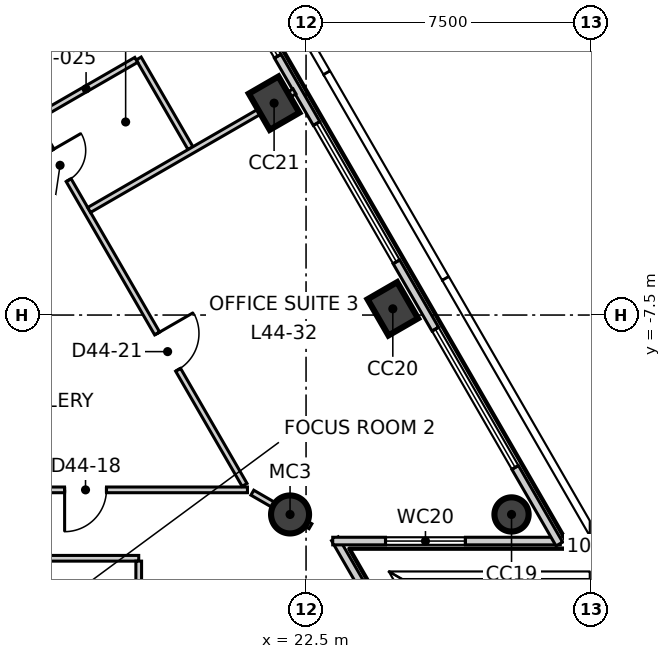
"""IFC4 building model, lengths in metres.
Left out: names, types, materials, properties, quantities, classifications, styles, units other than length and angle.
Written with IfcOpenShell. Run it as: python <this file> out.ifc"""

import sys

from ifc_helpers import new_model, si_unit, direction, frame, frame_2d, origin, origin_2d, place, context, subcontext, project, spatial, rectangle, circle, extrude, element, fill, save


model = new_model("IFC4")
c1 = context("Model", 3, precision=1e-05, world=origin(), true_north=direction((0.0, 1.0)))
c2 = subcontext(c1, "Body", "Model", "MODEL_VIEW")
j1 = project(units=[si_unit("LENGTHUNIT", "METRE"), si_unit("PLANEANGLEUNIT", "RADIAN")], contexts=[c1])
p1 = place(None, origin())
s1 = spatial("IfcSite", under=j1, at=p1, CompositionType="ELEMENT")
p2 = place(p1, origin())
s2 = spatial("IfcBuilding", under=s1, at=p2, CompositionType="ELEMENT")
p3 = place(p2, frame((0.0, 0.0, 191.3)))
s3 = spatial("IfcBuildingStorey", under=s2, at=p3, CompositionType="ELEMENT", Elevation=191.3)
p4 = place(p3, frame((27.907, -12.747, -0.3), z_axis=(0.0, 0.0, 1.0), x_axis=(-0.5, 0.866025403784, 0.0)))
e1 = element("IfcColumn", 1, at=p4, inside=s3, PredefinedType="COLUMN", context=c2, shape_type="SweptSolid", body=[
    extrude(circle(Radius=0.45, at=origin_2d()), origin(), (0.0, 0.0, 1.0), 4.0),
])
for number, where, z_axis, x_axis in (
    (2, (24.783, -7.336, -0.3), (0.0, 0.0, 1.0), (-0.5, 0.866, 0.0)),
    (3, (21.659, -1.925, -0.3), (0.0, 0.0, 1.0), (-0.5, 0.866, 0.0)),
):
    element("IfcColumn", number, at=place(p3, frame(where, z_axis=z_axis, x_axis=x_axis)), inside=s3, PredefinedType="COLUMN", context=c2, shape_type="SweptSolid", body=[
        extrude(rectangle(XDim=1.1, YDim=0.9, at=origin_2d()), origin(), (0.0, 0.0, 1.0), 4.0),
    ])
p5 = place(p3, frame((22.079, -12.747, -0.3), z_axis=(0.0, 0.0, 1.0), x_axis=(1.0, 0.0, 0.0)))
e4 = element("IfcColumn", 4, at=p5, inside=s3, PredefinedType="COLUMN", context=c2, shape_type="SweptSolid", body=[
    extrude(circle(Radius=0.5, at=origin_2d()), origin(), (0.0, 0.0, 1.0), 4.0),
])
p6 = place(p3, frame((26.251, -18.573, 0.0), z_axis=(0.0, 0.0, 1.0), x_axis=(-0.499896541353, 0.866085127423, 0.0)))
e5 = element("IfcWall", 5, at=p6, inside=s3, PredefinedType="ELEMENTEDWALL", context=c2, shape_type="SweptSolid", body=[
    extrude(rectangle(XDim=5.989, YDim=0.2, at=frame_2d((2.995, 0.0))), origin(), (0.0, 0.0, 1.0), 3.7),
])
p7 = place(p6, frame((1.99, 0.0, 0.9)))
e6 = element("IfcOpeningElement", 6, at=p7, cuts=e5, PredefinedType="OPENING", context=c2, shape_type="SweptSolid", body=[
    extrude(rectangle(XDim=2.1, YDim=2.5, at=frame_2d((1.05, 1.25))), frame((0.0, 0.11, 0.0), z_axis=(0.0, -1.0, 0.0), x_axis=(1.0, 0.0, 0.0)), (0.0, 0.0, 1.0), 0.22),
])
p8 = place(p3, frame((23.202, -13.447, 0.0), z_axis=(0.0, 0.0, 1.0), x_axis=(1.0, 0.0, 0.0)))
e7 = element("IfcWall", 7, at=p8, inside=s3, PredefinedType="ELEMENTEDWALL", context=c2, shape_type="SweptSolid", body=[
    extrude(rectangle(XDim=5.988, YDim=0.2, at=frame_2d((2.994, 0.0))), origin(), (0.0, 0.0, 1.0), 3.7),
])
p9 = place(p8, frame((1.39, 0.0, 0.9)))
e8 = element("IfcOpeningElement", 8, at=p9, cuts=e7, PredefinedType="OPENING", context=c2, shape_type="SweptSolid", body=[
    extrude(rectangle(XDim=2.1, YDim=2.5, at=frame_2d((1.05, 1.25))), frame((0.0, 0.11, 0.0), z_axis=(0.0, -1.0, 0.0), x_axis=(1.0, 0.0, 0.0)), (0.0, 0.0, 1.0), 0.22),
])
p10 = place(p3, frame((29.165, -13.525, 0.0), z_axis=(0.0, 0.0, 1.0), x_axis=(-0.500008941164, 0.86602024154, 0.0)))
e9 = element("IfcWall", 9, at=p10, inside=s3, PredefinedType="ELEMENTEDWALL", context=c2, shape_type="SweptSolid", body=[
    extrude(rectangle(XDim=52.571, YDim=0.2, at=frame_2d((26.286, 0.0))), origin(), (0.0, 0.0, 1.0), 3.7),
])
p11 = place(p10, frame((2.327, 0.0, 0.9)))
e10 = element("IfcOpeningElement", 10, at=p11, cuts=e9, PredefinedType="OPENING", context=c2, shape_type="SweptSolid", body=[
    extrude(rectangle(XDim=4.2, YDim=2.5, at=frame_2d((2.1, 1.25))), frame((0.0, 0.11, 0.0), z_axis=(0.0, -1.0, 0.0), x_axis=(1.0, 0.0, 0.0)), (0.0, 0.0, 1.0), 0.22),
])
p12 = place(p10, frame((8.575, 0.0, 0.9)))
e11 = element("IfcOpeningElement", 11, at=p12, cuts=e9, PredefinedType="OPENING", context=c2, shape_type="SweptSolid", body=[
    extrude(rectangle(XDim=4.2, YDim=2.5, at=frame_2d((2.1, 1.25))), frame((0.0, 0.11, 0.0), z_axis=(0.0, -1.0, 0.0), x_axis=(1.0, 0.0, 0.0)), (0.0, 0.0, 1.0), 0.22),
])
p13 = place(p10, frame((14.823, 0.0, 0.9)))
e12 = element("IfcOpeningElement", 12, at=p13, cuts=e9, PredefinedType="OPENING", context=c2, shape_type="SweptSolid", body=[
    extrude(rectangle(XDim=4.2, YDim=2.5, at=frame_2d((2.1, 1.25))), frame((0.0, 0.11, 0.0), z_axis=(0.0, -1.0, 0.0), x_axis=(1.0, 0.0, 0.0)), (0.0, 0.0, 1.0), 0.22),
])
p14 = place(p10, frame((21.072, 0.0, 0.9)))
e13 = element("IfcOpeningElement", 13, at=p14, cuts=e9, PredefinedType="OPENING", context=c2, shape_type="SweptSolid", body=[
    extrude(rectangle(XDim=4.2, YDim=2.5, at=frame_2d((2.1, 1.25))), frame((0.0, 0.11, 0.0), z_axis=(0.0, -1.0, 0.0), x_axis=(1.0, 0.0, 0.0)), (0.0, 0.0, 1.0), 0.22),
])
p15 = place(p10, frame((27.32, 0.0, 0.9)))
e14 = element("IfcOpeningElement", 14, at=p15, cuts=e9, PredefinedType="OPENING", context=c2, shape_type="SweptSolid", body=[
    extrude(rectangle(XDim=4.2, YDim=2.5, at=frame_2d((2.1, 1.25))), frame((0.0, 0.11, 0.0), z_axis=(0.0, -1.0, 0.0), x_axis=(1.0, 0.0, 0.0)), (0.0, 0.0, 1.0), 0.22),
])
p16 = place(p10, frame((33.568, 0.0, 0.9)))
e15 = element("IfcOpeningElement", 15, at=p16, cuts=e9, PredefinedType="OPENING", context=c2, shape_type="SweptSolid", body=[
    extrude(rectangle(XDim=4.2, YDim=2.5, at=frame_2d((2.1, 1.25))), frame((0.0, 0.11, 0.0), z_axis=(0.0, -1.0, 0.0), x_axis=(1.0, 0.0, 0.0)), (0.0, 0.0, 1.0), 0.22),
])
p17 = place(p10, frame((39.816, 0.0, 0.9)))
e16 = element("IfcOpeningElement", 16, at=p17, cuts=e9, PredefinedType="OPENING", context=c2, shape_type="SweptSolid", body=[
    extrude(rectangle(XDim=4.2, YDim=2.5, at=frame_2d((2.1, 1.25))), frame((0.0, 0.11, 0.0), z_axis=(0.0, -1.0, 0.0), x_axis=(1.0, 0.0, 0.0)), (0.0, 0.0, 1.0), 0.22),
])
p18 = place(p10, frame((46.064, 0.0, 0.9)))
e17 = element("IfcOpeningElement", 17, at=p18, cuts=e9, PredefinedType="OPENING", context=c2, shape_type="SweptSolid", body=[
    extrude(rectangle(XDim=4.2, YDim=2.5, at=frame_2d((2.1, 1.25))), frame((0.0, 0.11, 0.0), z_axis=(0.0, -1.0, 0.0), x_axis=(1.0, 0.0, 0.0)), (0.0, 0.0, 1.0), 0.22),
])
p19 = place(p3, frame((-20.808, -12.1, 0.0), z_axis=(0.0, 0.0, 1.0), x_axis=(1.0, 0.0, 0.0)))
e18 = element("IfcWall", 18, at=p19, inside=s3, PredefinedType="PARTITIONING", context=c2, shape_type="SweptSolid", body=[
    extrude(rectangle(XDim=41.766, YDim=0.15, at=frame_2d((20.883, 0.0))), origin(), (0.0, 0.0, 1.0), 3.7),
])
p20 = place(p19, frame((3.5, 0.0, 0.0)))
e19 = element("IfcOpeningElement", 19, at=p20, cuts=e18, PredefinedType="OPENING", context=c2, shape_type="SweptSolid", body=[
    extrude(rectangle(XDim=1.1, YDim=2.1, at=frame_2d((0.55, 1.05))), frame((0.0, 0.085, 0.0), z_axis=(0.0, -1.0, 0.0), x_axis=(1.0, 0.0, 0.0)), (0.0, 0.0, 1.0), 0.17),
])
p21 = place(p19, frame((18.362, 0.0, 0.0)))
e20 = element("IfcOpeningElement", 20, at=p21, cuts=e18, PredefinedType="OPENING", context=c2, shape_type="SweptSolid", body=[
    extrude(rectangle(XDim=1.1, YDim=2.1, at=frame_2d((0.55, 1.05))), frame((0.0, 0.085, 0.0), z_axis=(0.0, -1.0, 0.0), x_axis=(1.0, 0.0, 0.0)), (0.0, 0.0, 1.0), 0.17),
])
p22 = place(p19, frame((9.462, 0.0, 0.0)))
e21 = element("IfcOpeningElement", 21, at=p22, cuts=e18, PredefinedType="OPENING", context=c2, shape_type="SweptSolid", body=[
    extrude(rectangle(XDim=0.9, YDim=2.1, at=frame_2d((0.45, 1.05))), frame((0.0, 0.085, 0.0), z_axis=(0.0, -1.0, 0.0), x_axis=(1.0, 0.0, 0.0)), (0.0, 0.0, 1.0), 0.17),
])
p23 = place(p19, frame((12.662, 0.0, 0.0)))
e22 = element("IfcOpeningElement", 22, at=p23, cuts=e18, PredefinedType="OPENING", context=c2, shape_type="SweptSolid", body=[
    extrude(rectangle(XDim=0.9, YDim=2.1, at=frame_2d((0.45, 1.05))), frame((0.0, 0.085, 0.0), z_axis=(0.0, -1.0, 0.0), x_axis=(1.0, 0.0, 0.0)), (0.0, 0.0, 1.0), 0.17),
])
p24 = place(p19, frame((15.362, 0.0, 0.0)))
e23 = element("IfcOpeningElement", 23, at=p24, cuts=e18, PredefinedType="OPENING", context=c2, shape_type="SweptSolid", body=[
    extrude(rectangle(XDim=1.0, YDim=2.1, at=frame_2d((0.5, 1.05))), frame((0.0, 0.085, 0.0), z_axis=(0.0, -1.0, 0.0), x_axis=(1.0, 0.0, 0.0)), (0.0, 0.0, 1.0), 0.17),
])
p25 = place(p19, frame((26.458, 0.0, 0.0)))
e24 = element("IfcOpeningElement", 24, at=p25, cuts=e18, PredefinedType="OPENING", context=c2, shape_type="SweptSolid", body=[
    extrude(rectangle(XDim=1.1, YDim=2.1, at=frame_2d((0.55, 1.05))), frame((0.0, 0.085, 0.0), z_axis=(0.0, -1.0, 0.0), x_axis=(1.0, 0.0, 0.0)), (0.0, 0.0, 1.0), 0.17),
])
p26 = place(p19, frame((36.955, 0.0, 0.0)))
e25 = element("IfcOpeningElement", 25, at=p26, cuts=e18, PredefinedType="OPENING", context=c2, shape_type="SweptSolid", body=[
    extrude(rectangle(XDim=1.1, YDim=2.1, at=frame_2d((0.55, 1.05))), frame((0.0, 0.085, 0.0), z_axis=(0.0, -1.0, 0.0), x_axis=(1.0, 0.0, 0.0)), (0.0, 0.0, 1.0), 0.17),
])
p27 = place(p3, frame((21.087, -12.174, 0.0), z_axis=(0.0, 0.0, 1.0), x_axis=(0.866022094817, -0.500005731256, 0.0)))
e26 = element("IfcWall", 26, at=p27, inside=s3, PredefinedType="PARTITIONING", context=c2, shape_type="SweptSolid", body=[
    extrude(rectangle(XDim=1.766, YDim=0.15, at=frame_2d((0.883, 0.0))), origin(), (0.0, 0.0, 1.0), 3.2),
])
p28 = place(p3, frame((0.075, 24.07, 0.0), z_axis=(0.0, 0.0, 1.0), x_axis=(0.49999939571, -0.866025752671, 0.0)))
e27 = element("IfcWall", 27, at=p28, inside=s3, PredefinedType="PARTITIONING", context=c2, shape_type="SweptSolid", body=[
    extrude(rectangle(XDim=41.614, YDim=0.15, at=frame_2d((20.807, 0.0))), origin(), (0.0, 0.0, 1.0), 3.7),
])
p29 = place(p28, frame((37.015, 0.0, 0.0)))
e28 = element("IfcOpeningElement", 28, at=p29, cuts=e27, PredefinedType="OPENING", context=c2, shape_type="SweptSolid", body=[
    extrude(rectangle(XDim=1.1, YDim=2.1, at=frame_2d((0.55, 1.05))), frame((0.0, 0.085, 0.0), z_axis=(0.0, -1.0, 0.0), x_axis=(1.0, 0.0, 0.0)), (0.0, 0.0, 1.0), 0.17),
])
p30 = place(p28, frame((25.154, 0.0, 0.0)))
e29 = element("IfcOpeningElement", 29, at=p30, cuts=e27, PredefinedType="OPENING", context=c2, shape_type="SweptSolid", body=[
    extrude(rectangle(XDim=1.0, YDim=2.1, at=frame_2d((0.5, 1.05))), frame((0.0, 0.085, 0.0), z_axis=(0.0, -1.0, 0.0), x_axis=(1.0, 0.0, 0.0)), (0.0, 0.0, 1.0), 0.17),
])
p31 = place(p28, frame((31.454, 0.0, 0.0)))
e30 = element("IfcOpeningElement", 30, at=p31, cuts=e27, PredefinedType="OPENING", context=c2, shape_type="SweptSolid", body=[
    extrude(rectangle(XDim=0.9, YDim=2.1, at=frame_2d((0.45, 1.05))), frame((0.0, 0.085, 0.0), z_axis=(0.0, -1.0, 0.0), x_axis=(1.0, 0.0, 0.0)), (0.0, 0.0, 1.0), 0.17),
])
p32 = place(p28, frame((17.157, 0.0, 0.0)))
e31 = element("IfcOpeningElement", 31, at=p32, cuts=e27, PredefinedType="OPENING", context=c2, shape_type="SweptSolid", body=[
    extrude(rectangle(XDim=1.0, YDim=2.1, at=frame_2d((0.5, 1.05))), frame((0.0, 0.085, 0.0), z_axis=(0.0, -1.0, 0.0), x_axis=(1.0, 0.0, 0.0)), (0.0, 0.0, 1.0), 0.17),
])
p33 = place(p28, frame((6.609, 0.0, 0.0)))
e32 = element("IfcOpeningElement", 32, at=p33, cuts=e27, PredefinedType="OPENING", context=c2, shape_type="SweptSolid", body=[
    extrude(rectangle(XDim=1.1, YDim=2.1, at=frame_2d((0.55, 1.05))), frame((0.0, 0.085, 0.0), z_axis=(0.0, -1.0, 0.0), x_axis=(1.0, 0.0, 0.0)), (0.0, 0.0, 1.0), 0.17),
])
p34 = place(p3, frame((18.096, -0.749, 0.0), z_axis=(0.0, 0.0, 1.0), x_axis=(0.500156697144, -0.865934915743, 0.0)))
e33 = element("IfcWall", 33, at=p34, inside=s3, PredefinedType="PARTITIONING", context=c2, shape_type="SweptSolid", body=[
    extrude(rectangle(XDim=2.725, YDim=0.15, at=frame_2d((1.363, 0.0))), origin(), (0.0, 0.0, 1.0), 3.7),
])
p35 = place(p3, frame((15.392, -2.31, 0.0), z_axis=(0.0, 0.0, 1.0), x_axis=(0.865941409278, 0.50014545454, 0.0)))
e34 = element("IfcWall", 34, at=p35, inside=s3, PredefinedType="PARTITIONING", context=c2, shape_type="SweptSolid", body=[
    extrude(rectangle(XDim=3.047, YDim=0.15, at=frame_2d((1.524, 0.0))), origin(), (0.0, 0.0, 1.0), 3.7),
])
p36 = place(p3, frame((16.792, -4.735, 0.0), z_axis=(0.0, 0.0, 1.0), x_axis=(0.86601944389, 0.500010322698, 0.0)))
e35 = element("IfcWall", 35, at=p36, inside=s3, PredefinedType="PARTITIONING", context=c2, shape_type="SweptSolid", body=[
    extrude(rectangle(XDim=6.24, YDim=0.15, at=frame_2d((3.12, 0.0))), origin(), (0.0, 0.0, 1.0), 3.7),
])
p37 = place(p3, frame((12.572, -13.9, 0.0), z_axis=(0.0, 0.0, 1.0), x_axis=(1.0, 0.0, 0.0)))
e36 = element("IfcWall", 36, at=p37, inside=s3, PredefinedType="PARTITIONING", context=c2, shape_type="SweptSolid", body=[
    extrude(rectangle(XDim=5.525, YDim=0.15, at=frame_2d((2.762, 0.0))), origin(), (0.0, 0.0, 1.0), 3.7),
])
p38 = place(p3, frame((18.097, -17.023, 0.0), z_axis=(0.0, 0.0, 1.0), x_axis=(0.0, 1.0, 0.0)))
e37 = element("IfcWall", 37, at=p38, inside=s3, PredefinedType="PARTITIONING", context=c2, shape_type="SweptSolid", body=[
    extrude(rectangle(XDim=3.048, YDim=0.15, at=frame_2d((1.524, 0.0))), origin(), (0.0, 0.0, 1.0), 3.7),
])
p39 = place(p38, frame((1.073, 0.0, 0.0)))
e38 = element("IfcOpeningElement", 38, at=p39, cuts=e37, PredefinedType="OPENING", context=c2, shape_type="SweptSolid", body=[
    extrude(rectangle(XDim=0.9, YDim=2.1, at=frame_2d((0.45, 1.05))), frame((0.0, 0.085, 0.0), z_axis=(0.0, -1.0, 0.0), x_axis=(1.0, 0.0, 0.0)), (0.0, 0.0, 1.0), 0.17),
])
p40 = place(p9, origin())
e39 = element("IfcWindow", 39, at=p40, inside=s3, PartitioningType="SINGLE_PANEL", PredefinedType="WINDOW", context=c2, shape_type="SweptSolid", body=[
    extrude(rectangle(XDim=2.1, YDim=2.5, at=frame_2d((1.05, 1.25))), frame((0.0, 0.03, 0.0), z_axis=(0.0, -1.0, 0.0), x_axis=(1.0, 0.0, 0.0)), (0.0, 0.0, 1.0), 0.06),
])
fill(e8, e39)
p41 = place(p11, origin())
e40 = element("IfcWindow", 40, at=p41, inside=s3, PartitioningType="SINGLE_PANEL", PredefinedType="WINDOW", context=c2, shape_type="SweptSolid", body=[
    extrude(rectangle(XDim=4.2, YDim=2.5, at=frame_2d((2.1, 1.25))), frame((0.0, 0.03, 0.0), z_axis=(0.0, -1.0, 0.0), x_axis=(1.0, 0.0, 0.0)), (0.0, 0.0, 1.0), 0.06),
])
fill(e10, e40)
p42 = place(p12, origin())
e41 = element("IfcWindow", 41, at=p42, inside=s3, PartitioningType="SINGLE_PANEL", PredefinedType="WINDOW", context=c2, shape_type="SweptSolid", body=[
    extrude(rectangle(XDim=4.2, YDim=2.5, at=frame_2d((2.1, 1.25))), frame((0.0, 0.03, 0.0), z_axis=(0.0, -1.0, 0.0), x_axis=(1.0, 0.0, 0.0)), (0.0, 0.0, 1.0), 0.06),
])
fill(e11, e41)
p43 = place(p13, origin())
e42 = element("IfcWindow", 42, at=p43, inside=s3, PartitioningType="SINGLE_PANEL", PredefinedType="WINDOW", context=c2, shape_type="SweptSolid", body=[
    extrude(rectangle(XDim=4.2, YDim=2.5, at=frame_2d((2.1, 1.25))), frame((0.0, 0.03, 0.0), z_axis=(0.0, -1.0, 0.0), x_axis=(1.0, 0.0, 0.0)), (0.0, 0.0, 1.0), 0.06),
])
fill(e12, e42)
p44 = place(p26, origin())
e43 = element("IfcDoor", 43, at=p44, inside=s3, OperationType="SINGLE_SWING_LEFT", PredefinedType="DOOR", context=c2, shape_type="SweptSolid", body=[
    extrude(rectangle(XDim=1.1, YDim=2.1, at=frame_2d((0.55, 1.05))), frame((0.0, 0.025, 0.0), z_axis=(0.0, -1.0, 0.0), x_axis=(1.0, 0.0, 0.0)), (0.0, 0.0, 1.0), 0.05),
])
fill(e25, e43)
p45 = place(p29, origin())
e44 = element("IfcDoor", 44, at=p45, inside=s3, OperationType="SINGLE_SWING_RIGHT", PredefinedType="DOOR", context=c2, shape_type="SweptSolid", body=[
    extrude(rectangle(XDim=1.1, YDim=2.1, at=frame_2d((0.55, 1.05))), frame((0.0, 0.025, 0.0), z_axis=(0.0, -1.0, 0.0), x_axis=(1.0, 0.0, 0.0)), (0.0, 0.0, 1.0), 0.05),
])
fill(e28, e44)
p46 = place(p31, origin())
e45 = element("IfcDoor", 45, at=p46, inside=s3, OperationType="SINGLE_SWING_RIGHT", PredefinedType="DOOR", context=c2, shape_type="SweptSolid", body=[
    extrude(rectangle(XDim=0.9, YDim=2.1, at=frame_2d((0.45, 1.05))), frame((0.0, 0.025, 0.0), z_axis=(0.0, -1.0, 0.0), x_axis=(1.0, 0.0, 0.0)), (0.0, 0.0, 1.0), 0.05),
])
fill(e30, e45)
save(model, sys.argv[1])
